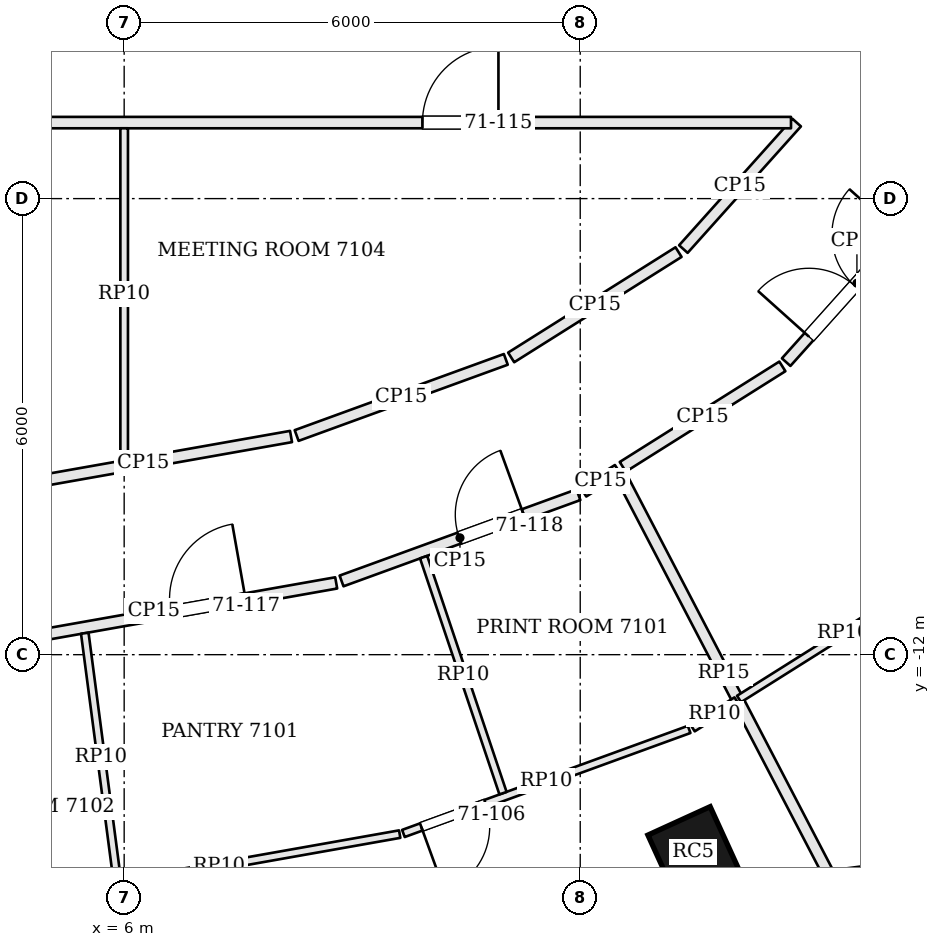
"""IFC4 building model, lengths in metres.
Left out: names, types, materials, properties, quantities, classifications, styles, units other than length and angle.
Written with IfcOpenShell. Run it as: python <this file> out.ifc"""

import sys

from ifc_helpers import new_model, si_unit, direction, frame, frame_2d, origin, origin_2d, place, context, subcontext, project, spatial, rectangle, extrude, element, fill, save


model = new_model("IFC4")
c1 = context("Model", 3, precision=1e-05, world=origin(), true_north=direction((0.0, 1.0)))
c2 = subcontext(c1, "Body", "Model", "MODEL_VIEW")
j1 = project(units=[si_unit("LENGTHUNIT", "METRE"), si_unit("PLANEANGLEUNIT", "RADIAN")], contexts=[c1])
p1 = place(None, origin())
s1 = spatial("IfcSite", under=j1, at=p1, CompositionType="ELEMENT")
p2 = place(p1, origin())
s2 = spatial("IfcBuilding", under=s1, at=p2, CompositionType="ELEMENT")
p3 = place(p2, frame((0.0, 0.0, 288.3)))
s3 = spatial("IfcBuildingStorey", under=s2, at=p3, CompositionType="ELEMENT", Elevation=288.3)
p4 = place(p3, frame((13.487, -14.596, 0.0), z_axis=(0.0, 0.0, 1.0), x_axis=(0.90972649622, 0.415208022652, 0.0)))
e1 = element("IfcColumn", 1, at=p4, inside=s3, PredefinedType="COLUMN", context=c2, shape_type="SweptSolid", body=[
    extrude(rectangle(XDim=0.9, YDim=0.9, at=origin_2d()), origin(), (0.0, 0.0, 1.0), 3.9),
])
p5 = place(p3, frame((14.697, -15.143, 0.0), z_axis=(0.0, 0.0, 1.0), x_axis=(0.991631798411, 0.129098320597, 0.0)))
e2 = element("IfcWall", 2, at=p5, inside=s3, PredefinedType="SOLIDWALL", context=c2, shape_type="SweptSolid", body=[
    extrude(rectangle(XDim=5.547, YDim=0.45, at=frame_2d((2.773, 0.0))), origin(), (0.0, 0.0, 1.0), 3.7),
])
p6 = place(p5, frame((1.723, 0.0, 0.9)))
e3 = element("IfcOpeningElement", 3, at=p6, cuts=e2, PredefinedType="OPENING", context=c2, shape_type="SweptSolid", body=[
    extrude(rectangle(XDim=2.1, YDim=2.3, at=frame_2d((1.05, 1.15))), frame((0.0, 0.235, 0.0), z_axis=(0.0, -1.0, 0.0), x_axis=(1.0, 0.0, 0.0)), (0.0, 0.0, 1.0), 0.47),
])
p7 = place(p3, frame((4.594, -11.799, 0.0), z_axis=(0.0, 0.0, 1.0), x_axis=(0.984693444773, 0.174295208833, 0.0)))
e4 = element("IfcWall", 4, at=p7, inside=s3, PredefinedType="PARTITIONING", context=c2, shape_type="SweptSolid", body=[
    extrude(rectangle(XDim=4.261, YDim=0.15, at=frame_2d((2.13, 0.0))), origin(), (0.0, 0.0, 1.0), 3.198),
])
p8 = place(p7, frame((2.05, 0.0, 0.0)))
e5 = element("IfcOpeningElement", 5, at=p8, cuts=e4, PredefinedType="OPENING", context=c2, shape_type="SweptSolid", body=[
    extrude(rectangle(XDim=1.0, YDim=2.1, at=frame_2d((0.5, 1.05))), frame((0.0, 0.085, 0.0), z_axis=(0.0, -1.0, 0.0), x_axis=(1.0, 0.0, 0.0)), (0.0, 0.0, 1.0), 0.17),
])
p9 = place(p3, frame((8.86, -11.03, 0.0), z_axis=(0.0, 0.0, 1.0), x_axis=(0.939685902536, 0.342038601001, 0.0)))
e6 = element("IfcWall", 6, at=p9, inside=s3, PredefinedType="PARTITIONING", context=c2, shape_type="SweptSolid", body=[
    extrude(rectangle(XDim=3.316, YDim=0.15, at=frame_2d((1.658, 0.0))), origin(), (0.0, 0.0, 1.0), 3.198),
])
p10 = place(p9, frame((1.65, 0.0, 0.0)))
e7 = element("IfcOpeningElement", 7, at=p10, cuts=e6, PredefinedType="OPENING", context=c2, shape_type="SweptSolid", body=[
    extrude(rectangle(XDim=0.9, YDim=2.1, at=frame_2d((0.45, 1.05))), frame((0.0, 0.085, 0.0), z_axis=(0.0, -1.0, 0.0), x_axis=(1.0, 0.0, 0.0)), (0.0, 0.0, 1.0), 0.17),
])
p11 = place(p3, frame((12.04, -9.856, 0.0), z_axis=(0.0, 0.0, 1.0), x_axis=(0.846240393033, 0.532801273647, 0.0)))
e8 = element("IfcWall", 8, at=p11, inside=s3, PredefinedType="PARTITIONING", context=c2, shape_type="SweptSolid", body=[
    extrude(rectangle(XDim=0.54, YDim=0.15, at=frame_2d((0.27, 0.0))), origin(), (0.0, 0.0, 1.0), 3.198),
])
p12 = place(p3, frame((15.244, -14.841, 0.0), z_axis=(0.0, 0.0, 1.0), x_axis=(-0.462122511499, 0.886816093881, 0.0)))
e9 = element("IfcWall", 9, at=p12, inside=s3, PredefinedType="PARTITIONING", context=c2, shape_type="SweptSolid", body=[
    extrude(rectangle(XDim=5.871, YDim=0.15, at=frame_2d((2.935, 0.0))), origin(), (0.0, 0.0, 1.0), 3.234),
])
p13 = place(p3, frame((12.56, -9.529, 0.0), z_axis=(0.0, 0.0, 1.0), x_axis=(0.846402081662, 0.53254437952, 0.0)))
e10 = element("IfcWall", 10, at=p13, inside=s3, PredefinedType="PARTITIONING", context=c2, shape_type="SweptSolid", body=[
    extrude(rectangle(XDim=2.481, YDim=0.15, at=frame_2d((1.24, 0.0))), origin(), (0.0, 0.0, 1.0), 3.198),
])
p14 = place(p3, frame((14.709, -8.152, 0.0), z_axis=(0.0, 0.0, 1.0), x_axis=(0.667275630306, 0.744810870758, 0.0)))
e11 = element("IfcWall", 11, at=p14, inside=s3, PredefinedType="PARTITIONING", context=c2, shape_type="SweptSolid", body=[
    extrude(rectangle(XDim=2.79, YDim=0.15, at=frame_2d((1.395, 0.0))), origin(), (0.0, 0.0, 1.0), 3.198),
])
p15 = place(p14, frame((0.45, 0.0, 0.0)))
e12 = element("IfcOpeningElement", 12, at=p15, cuts=e11, PredefinedType="OPENING", context=c2, shape_type="SweptSolid", body=[
    extrude(rectangle(XDim=1.8, YDim=2.1, at=frame_2d((0.9, 1.05))), frame((0.0, 0.085, 0.0), z_axis=(0.0, -1.0, 0.0), x_axis=(1.0, 0.0, 0.0)), (0.0, 0.0, 1.0), 0.17),
])
p16 = place(p3, frame((14.848, -5.0, 0.0), z_axis=(0.0, 0.0, 1.0), x_axis=(-0.667363249373, -0.744732363595, 0.0)))
e13 = element("IfcWall", 13, at=p16, inside=s3, PredefinedType="PARTITIONING", context=c2, shape_type="SweptSolid", body=[
    extrude(rectangle(XDim=2.234, YDim=0.15, at=frame_2d((1.117, 0.0))), origin(), (0.0, 0.0, 1.0), 3.198),
])
p17 = place(p3, frame((13.293, -6.704, 0.0), z_axis=(0.0, 0.0, 1.0), x_axis=(-0.84641299998, -0.532527026041, 0.0)))
e14 = element("IfcWall", 14, at=p17, inside=s3, PredefinedType="PARTITIONING", context=c2, shape_type="SweptSolid", body=[
    extrude(rectangle(XDim=2.602, YDim=0.15, at=frame_2d((1.301, 0.0))), origin(), (0.0, 0.0, 1.0), 3.198),
])
p18 = place(p3, frame((11.021, -8.115, 0.0), z_axis=(0.0, 0.0, 1.0), x_axis=(-0.939683845313, -0.342044252778, 0.0)))
e15 = element("IfcWall", 15, at=p18, inside=s3, PredefinedType="PARTITIONING", context=c2, shape_type="SweptSolid", body=[
    extrude(rectangle(XDim=2.929, YDim=0.15, at=frame_2d((1.464, 0.0))), origin(), (0.0, 0.0, 1.0), 3.198),
])
p19 = place(p3, frame((8.195, -9.13, 0.0), z_axis=(0.0, 0.0, 1.0), x_axis=(-0.9846880937, -0.174325437403, 0.0)))
e16 = element("IfcWall", 16, at=p19, inside=s3, PredefinedType="PARTITIONING", context=c2, shape_type="SweptSolid", body=[
    extrude(rectangle(XDim=3.945, YDim=0.15, at=frame_2d((1.973, 0.0))), origin(), (0.0, 0.0, 1.0), 3.198),
])
p20 = place(p3, frame((-14.789, -5.0, 0.0), z_axis=(0.0, 0.0, 1.0), x_axis=(1.0, 0.0, 0.0)))
e17 = element("IfcWall", 17, at=p20, inside=s3, PredefinedType="PARTITIONING", context=c2, shape_type="SweptSolid", body=[
    extrude(rectangle(XDim=29.562, YDim=0.15, at=frame_2d((14.781, 0.0))), origin(), (0.0, 0.0, 1.0), 3.198),
])
p21 = place(p20, frame((3.857, 0.0, 0.0)))
e18 = element("IfcOpeningElement", 18, at=p21, cuts=e17, PredefinedType="OPENING", context=c2, shape_type="SweptSolid", body=[
    extrude(rectangle(XDim=1.0, YDim=2.4, at=frame_2d((0.5, 1.2))), frame((0.0, 0.085, 0.0), z_axis=(0.0, -1.0, 0.0), x_axis=(1.0, 0.0, 0.0)), (0.0, 0.0, 1.0), 0.17),
])
p22 = place(p20, frame((14.289, 0.0, 0.0)))
e19 = element("IfcOpeningElement", 19, at=p22, cuts=e17, PredefinedType="OPENING", context=c2, shape_type="SweptSolid", body=[
    extrude(rectangle(XDim=1.0, YDim=2.1, at=frame_2d((0.5, 1.05))), frame((0.0, 0.085, 0.0), z_axis=(0.0, -1.0, 0.0), x_axis=(1.0, 0.0, 0.0)), (0.0, 0.0, 1.0), 0.17),
])
p23 = place(p20, frame((24.713, 0.0, 0.0)))
e20 = element("IfcOpeningElement", 20, at=p23, cuts=e17, PredefinedType="OPENING", context=c2, shape_type="SweptSolid", body=[
    extrude(rectangle(XDim=1.0, YDim=2.4, at=frame_2d((0.5, 1.2))), frame((0.0, 0.085, 0.0), z_axis=(0.0, -1.0, 0.0), x_axis=(1.0, 0.0, 0.0)), (0.0, 0.0, 1.0), 0.17),
])
p24 = place(p3, frame((14.056, -12.604, 0.0), z_axis=(0.0, 0.0, 1.0), x_axis=(-0.846544184051, -0.532318461496, 0.0)))
e21 = element("IfcWall", 21, at=p24, inside=s3, PredefinedType="PARTITIONING", context=c2, shape_type="SweptSolid", body=[
    extrude(rectangle(XDim=0.681, YDim=0.1, at=frame_2d((0.34, 0.0))), origin(), (0.0, 0.0, 1.0), 3.198),
])
p25 = place(p3, frame((13.433, -12.984, 0.0), z_axis=(0.0, 0.0, 1.0), x_axis=(-0.939673979614, -0.342071355182, 0.0)))
e22 = element("IfcWall", 22, at=p25, inside=s3, PredefinedType="PARTITIONING", context=c2, shape_type="SweptSolid", body=[
    extrude(rectangle(XDim=4.0, YDim=0.1, at=frame_2d((2.0, 0.0))), origin(), (0.0, 0.0, 1.0), 3.198),
])
p26 = place(p25, frame((2.85, 0.0, 0.0)))
e23 = element("IfcOpeningElement", 23, at=p26, cuts=e22, PredefinedType="OPENING", context=c2, shape_type="SweptSolid", body=[
    extrude(rectangle(XDim=0.9, YDim=2.1, at=frame_2d((0.45, 1.05))), frame((0.0, 0.06, 0.0), z_axis=(0.0, -1.0, 0.0), x_axis=(1.0, 0.0, 0.0)), (0.0, 0.0, 1.0), 0.12),
])
p27 = place(p3, frame((9.625, -14.361, 0.0), z_axis=(0.0, 0.0, 1.0), x_axis=(-0.984691710098, -0.174305008716, 0.0)))
e24 = element("IfcWall", 24, at=p27, inside=s3, PredefinedType="PARTITIONING", context=c2, shape_type="SweptSolid", body=[
    extrude(rectangle(XDim=4.824, YDim=0.1, at=frame_2d((2.412, 0.0))), origin(), (0.0, 0.0, 1.0), 3.198),
])
p28 = place(p3, frame((5.482, -11.718, 0.0), z_axis=(0.0, 0.0, 1.0), x_axis=(0.130173255727, -0.991491262439, 0.0)))
e25 = element("IfcWall", 25, at=p28, inside=s3, PredefinedType="PARTITIONING", context=c2, shape_type="SweptSolid", body=[
    extrude(rectangle(XDim=3.278, YDim=0.1, at=frame_2d((1.639, 0.0))), origin(), (0.0, 0.0, 1.0), 3.198),
])
p29 = place(p3, frame((9.94, -10.717, 0.0), z_axis=(0.0, 0.0, 1.0), x_axis=(0.318730603816, -0.947845347191, 0.0)))
e26 = element("IfcWall", 26, at=p29, inside=s3, PredefinedType="PARTITIONING", context=c2, shape_type="SweptSolid", body=[
    extrude(rectangle(XDim=3.276, YDim=0.1, at=frame_2d((1.638, 0.0))), origin(), (0.0, 0.0, 1.0), 3.198),
])
p30 = place(p3, frame((16.831, -10.858, 0.0), z_axis=(0.0, 0.0, 1.0), x_axis=(-0.846427876971, -0.532503379413, 0.0)))
e27 = element("IfcWall", 27, at=p30, inside=s3, PredefinedType="PARTITIONING", context=c2, shape_type="SweptSolid", body=[
    extrude(rectangle(XDim=3.239, YDim=0.1, at=frame_2d((1.62, 0.0))), origin(), (0.0, 0.0, 1.0), 3.198),
])
p31 = place(p3, frame((6.0, -9.444, 0.0), z_axis=(0.0, 0.0, 1.0), x_axis=(0.0, 1.0, 0.0)))
e28 = element("IfcWall", 28, at=p31, inside=s3, PredefinedType="PARTITIONING", context=c2, shape_type="SweptSolid", body=[
    extrude(rectangle(XDim=4.369, YDim=0.1, at=frame_2d((2.184, 0.0))), origin(), (0.0, 0.0, 1.0), 3.198),
])
p32 = place(p26, origin())
e29 = element("IfcDoor", 29, at=p32, inside=s3, OperationType="SINGLE_SWING_RIGHT", PredefinedType="DOOR", context=c2, shape_type="SweptSolid", body=[
    extrude(rectangle(XDim=0.9, YDim=2.1, at=frame_2d((0.45, 1.05))), frame((0.0, 0.025, 0.0), z_axis=(0.0, -1.0, 0.0), x_axis=(1.0, 0.0, 0.0)), (0.0, 0.0, 1.0), 0.05),
])
fill(e23, e29)
p33 = place(p15, origin())
e30 = element("IfcDoor", 30, at=p33, inside=s3, OperationType="DOUBLE_DOOR_SINGLE_SWING", PredefinedType="DOOR", context=c2, shape_type="SweptSolid", body=[
    extrude(rectangle(XDim=1.8, YDim=2.1, at=frame_2d((0.9, 1.05))), frame((0.0, 0.025, 0.0), z_axis=(0.0, -1.0, 0.0), x_axis=(1.0, 0.0, 0.0)), (0.0, 0.0, 1.0), 0.05),
])
fill(e12, e30)
p34 = place(p23, origin())
e31 = element("IfcDoor", 31, at=p34, inside=s3, OperationType="SINGLE_SWING_RIGHT", PredefinedType="DOOR", context=c2, shape_type="SweptSolid", body=[
    extrude(rectangle(XDim=1.0, YDim=2.4, at=frame_2d((0.5, 1.2))), frame((0.0, 0.025, 0.0), z_axis=(0.0, -1.0, 0.0), x_axis=(1.0, 0.0, 0.0)), (0.0, 0.0, 1.0), 0.05),
])
fill(e20, e31)
p35 = place(p8, origin())
e32 = element("IfcDoor", 32, at=p35, inside=s3, OperationType="SINGLE_SWING_RIGHT", PredefinedType="DOOR", context=c2, shape_type="SweptSolid", body=[
    extrude(rectangle(XDim=1.0, YDim=2.1, at=frame_2d((0.5, 1.05))), frame((0.0, 0.025, 0.0), z_axis=(0.0, -1.0, 0.0), x_axis=(1.0, 0.0, 0.0)), (0.0, 0.0, 1.0), 0.05),
])
fill(e5, e32)
p36 = place(p10, origin())
e33 = element("IfcDoor", 33, at=p36, inside=s3, OperationType="SINGLE_SWING_RIGHT", PredefinedType="DOOR", context=c2, shape_type="SweptSolid", body=[
    extrude(rectangle(XDim=0.9, YDim=2.1, at=frame_2d((0.45, 1.05))), frame((0.0, 0.025, 0.0), z_axis=(0.0, -1.0, 0.0), x_axis=(1.0, 0.0, 0.0)), (0.0, 0.0, 1.0), 0.05),
])
fill(e7, e33)
save(model, sys.argv[1])
